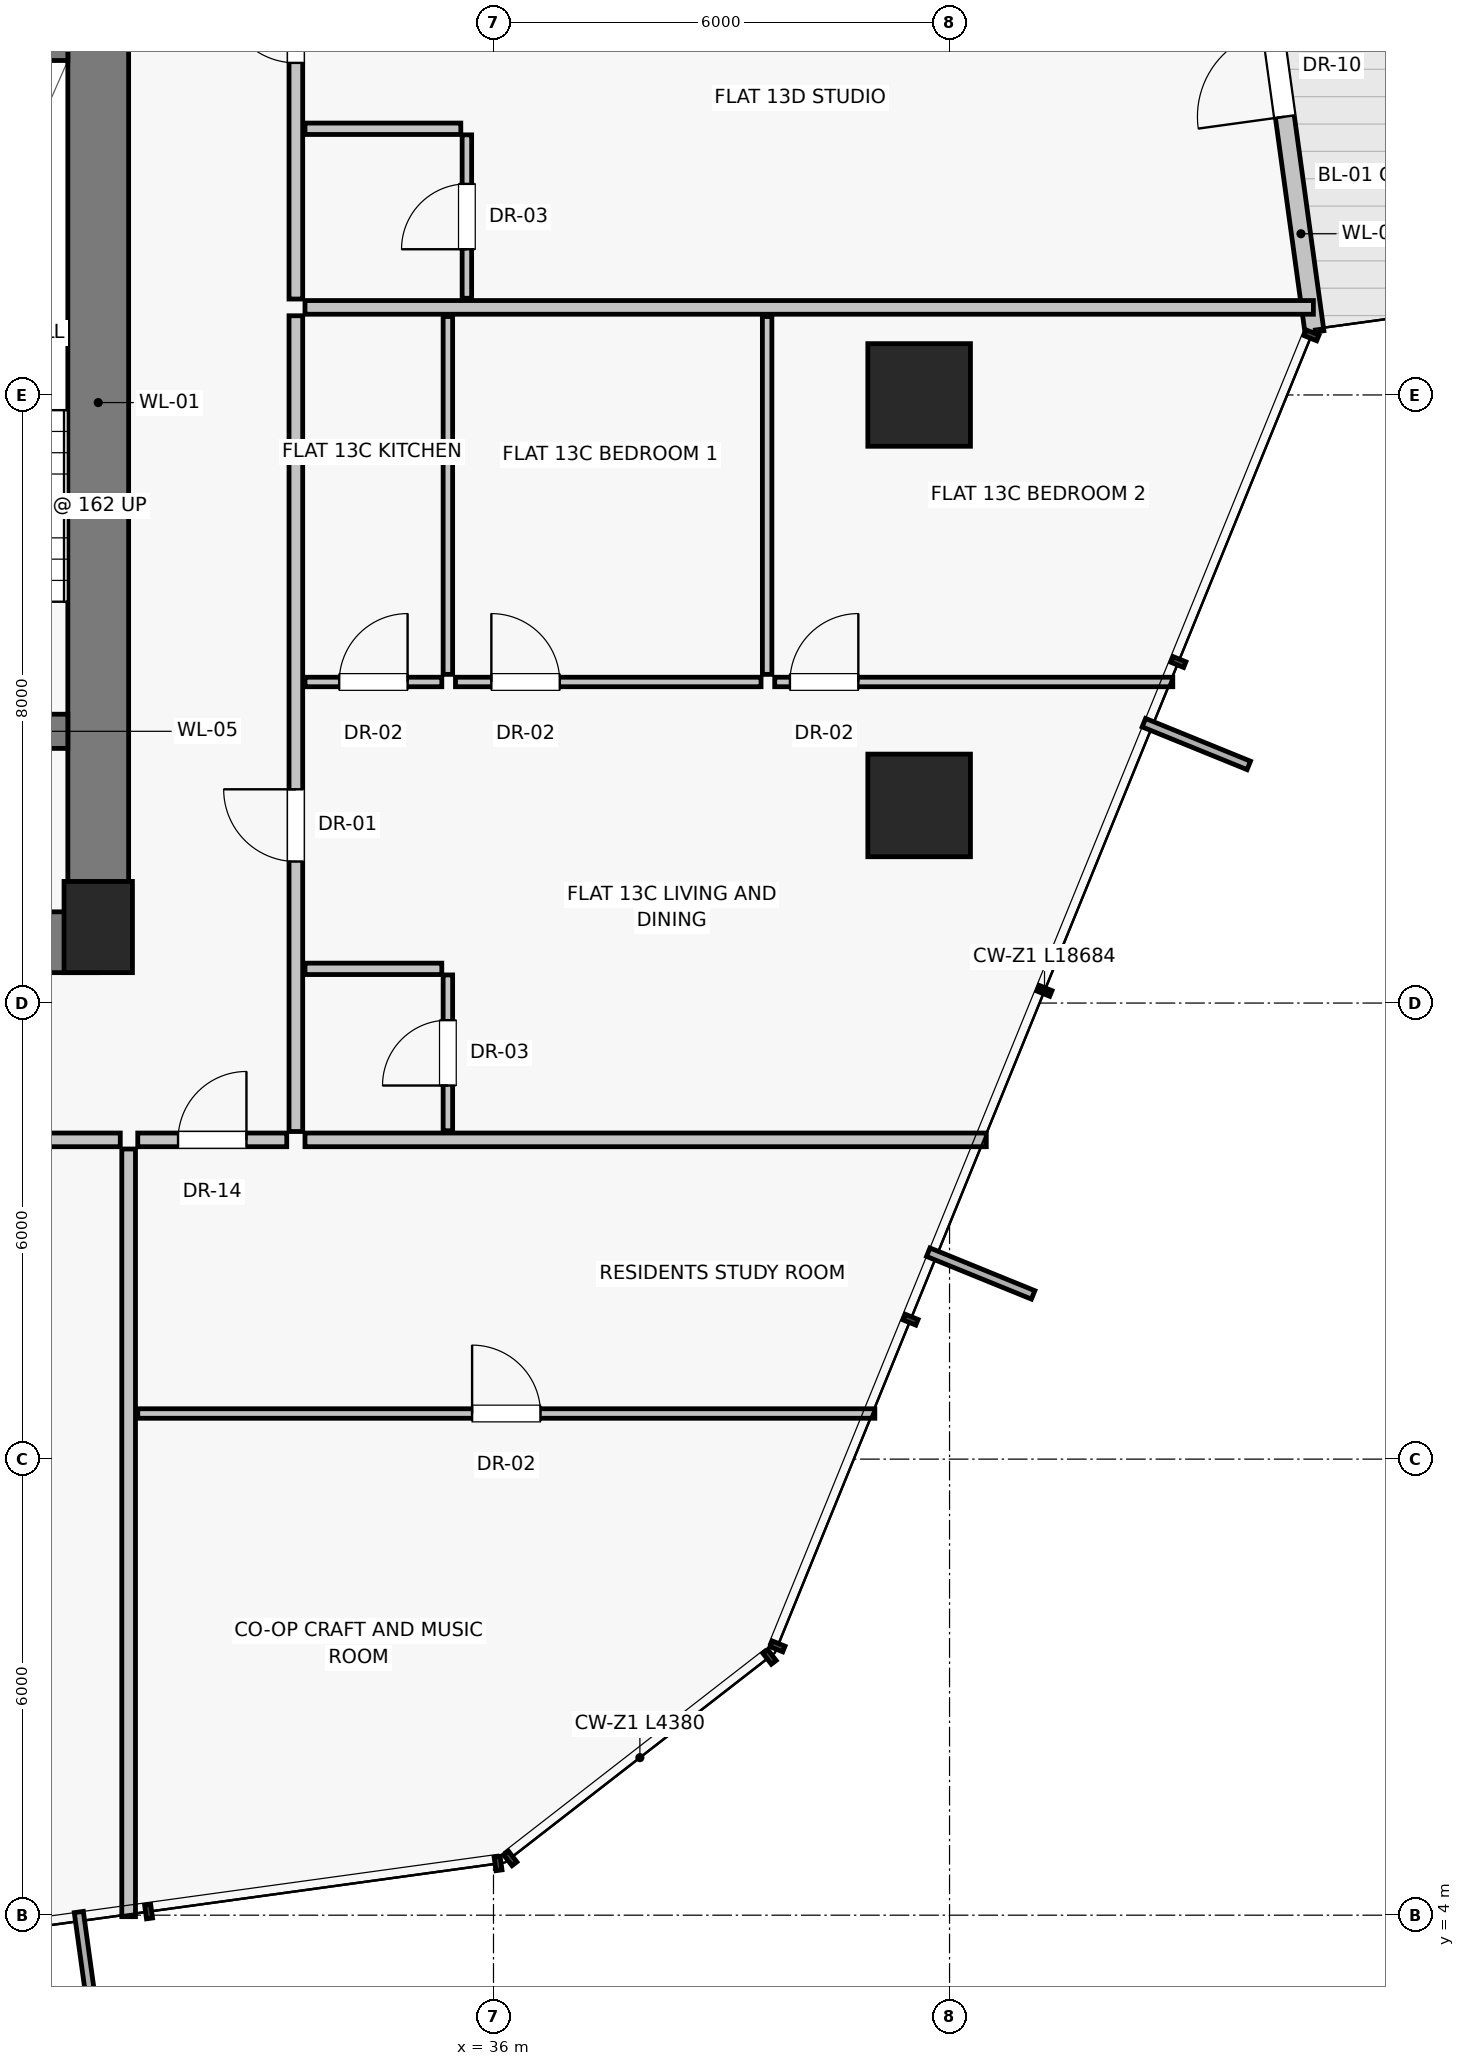
"""IFC4 building model, lengths in metres.
Left out: names, types, materials, properties, quantities, classifications, styles, units other than length and angle.
Written with IfcOpenShell. Run it as: python <this file> out.ifc"""

import sys

from ifc_helpers import new_model, si_unit, direction, frame, frame_2d, origin, origin_2d, place, context, subcontext, project, spatial, rectangle, extrude, source, transform, mapped, element, fill, save


model = new_model("IFC4")
c1 = context("Model", 3, precision=1e-05, world=origin(), true_north=direction((0.0, 1.0)))
c2 = subcontext(c1, "Body", "Model", "MODEL_VIEW")
j1 = project(units=[si_unit("LENGTHUNIT", "METRE"), si_unit("PLANEANGLEUNIT", "RADIAN")], contexts=[c1])
p1 = place(None, origin())
s1 = spatial("IfcSite", under=j1, at=p1, CompositionType="ELEMENT")
p2 = place(p1, origin())
s2 = spatial("IfcBuilding", under=s1, at=p2, CompositionType="ELEMENT")
p3 = place(p2, frame((0.0, 0.0, 50.05)))
s3 = spatial("IfcBuildingStorey", under=s2, at=p3, CompositionType="ELEMENT", Elevation=50.05)
p4 = place(p3, frame((30.8, 17.0, 0.0), z_axis=(0.0, 0.0, 1.0), x_axis=(1.0, 0.0, 0.0)))
e1 = element("IfcColumn", 1, at=p4, inside=s3, PredefinedType="PILASTER", context=c2, shape_type="SweptSolid", body=[
    extrude(rectangle(XDim=0.9, YDim=1.2, at=origin_2d()), origin(), (0.0, 0.0, 1.0), 3.25),
])
for number, where, z_axis, x_axis in (
    (2, (41.6, 18.6, 0.0), (0.0, 0.0, 1.0), (1.0, 0.0, 0.0)),
    (3, (41.6, 24.0, 0.0), (0.0, 0.0, 1.0), (1.0, 0.0, 0.0)),
):
    element("IfcColumn", number, at=place(p3, frame(where, z_axis=z_axis, x_axis=x_axis)), inside=s3, PredefinedType="COLUMN", context=c2, shape_type="SweptSolid", body=[
        extrude(rectangle(XDim=1.35, YDim=1.35, at=origin_2d()), origin(), (0.0, 0.0, 1.0), 3.25),
    ])
p5 = place(p3, frame((46.801, 24.828, 0.0), z_axis=(0.0, 0.0, 1.0), x_axis=(-0.136411912987, 0.990652204356, 0.0)))
e4 = element("IfcWall", 4, at=p5, inside=s3, PredefinedType="SOLIDWALL", context=c2, shape_type="SweptSolid", body=[
    extrude(rectangle(XDim=4.58, YDim=0.25, at=frame_2d((2.29, 0.0))), origin(), (0.0, 0.0, 1.0), 3.0),
])
p6 = place(p5, frame((2.86, 0.0, 0.0)))
e5 = element("IfcOpeningElement", 5, at=p6, cuts=e4, PredefinedType="OPENING", context=c2, shape_type="SweptSolid", body=[
    extrude(rectangle(XDim=1.15, YDim=2.25, at=frame_2d((0.575, 1.125))), frame((0.0, 0.135, 0.0), z_axis=(0.0, -1.0, 0.0), x_axis=(1.0, 0.0, 0.0)), (0.0, 0.0, 1.0), 0.27),
])
p7 = place(p3, frame((30.8, 16.8, 0.0), z_axis=(0.0, 0.0, 1.0), x_axis=(0.0, 1.0, 0.0)))
e6 = element("IfcWall", 6, at=p7, inside=s3, PredefinedType="SHEAR", context=c2, shape_type="SweptSolid", body=[
    extrude(rectangle(XDim=14.2, YDim=0.8, at=frame_2d((7.1, 0.0))), origin(), (0.0, 0.0, 1.0), 3.0),
])
p8 = place(p3, frame((24.95, 16.8, 0.0), z_axis=(0.0, 0.0, 1.0), x_axis=(1.0, 0.0, 0.0)))
e7 = element("IfcWall", 7, at=p8, inside=s3, PredefinedType="SHEAR", context=c2, shape_type="SweptSolid", body=[
    extrude(rectangle(XDim=5.85, YDim=0.8, at=frame_2d((2.925, 0.0))), origin(), (0.0, 0.0, 1.0), 3.0),
])
p9 = place(p8, frame((2.15, 0.0, 0.0)))
e8 = element("IfcOpeningElement", 8, at=p9, cuts=e7, PredefinedType="OPENING", context=c2, shape_type="SweptSolid", body=[
    extrude(rectangle(XDim=1.2, YDim=2.03, at=frame_2d((0.6, 1.015))), frame((0.0, 0.41, 0.0), z_axis=(0.0, -1.0, 0.0), x_axis=(1.0, 0.0, 0.0)), (0.0, 0.0, 1.0), 0.82),
])
p10 = place(p3, frame((26.975, 19.575, 0.0), z_axis=(0.0, 0.0, 1.0), x_axis=(1.0, 0.0, 0.0)))
e9 = element("IfcWall", 9, at=p10, inside=s3, PredefinedType="SHEAR", context=c2, shape_type="SweptSolid", body=[
    extrude(rectangle(XDim=3.425, YDim=0.45, at=frame_2d((1.712, 0.0))), origin(), (0.0, 0.0, 1.0), 3.0),
])
p11 = place(p10, frame((1.05, 0.0, 0.0)))
e10 = element("IfcOpeningElement", 10, at=p11, cuts=e9, PredefinedType="OPENING", context=c2, shape_type="SweptSolid", body=[
    extrude(rectangle(XDim=1.1, YDim=2.03, at=frame_2d((0.55, 1.015))), frame((0.0, 0.235, 0.0), z_axis=(0.0, -1.0, 0.0), x_axis=(1.0, 0.0, 0.0)), (0.0, 0.0, 1.0), 0.47),
])
p12 = place(p3, frame((26.975, 28.625, 0.0), z_axis=(0.0, 0.0, 1.0), x_axis=(1.0, 0.0, 0.0)))
e11 = element("IfcWall", 11, at=p12, inside=s3, PredefinedType="SHEAR", context=c2, shape_type="SweptSolid", body=[
    extrude(rectangle(XDim=3.425, YDim=0.45, at=frame_2d((1.712, 0.0))), origin(), (0.0, 0.0, 1.0), 3.0),
])
p13 = place(p3, frame((31.2, 14.08, 0.0), z_axis=(0.0, 0.0, 1.0), x_axis=(0.0, -1.0, 0.0)))
e12 = element("IfcWall", 12, at=p13, inside=s3, PredefinedType="PARTITIONING", context=c2, shape_type="SweptSolid", body=[
    extrude(rectangle(XDim=10.1, YDim=0.18, at=frame_2d((5.05, 0.0))), origin(), (0.0, 0.0, 1.0), 3.0),
])
p14 = place(p3, frame((24.368, 14.2, 0.0), z_axis=(0.0, 0.0, 1.0), x_axis=(1.0, 0.0, 0.0)))
e13 = element("IfcWall", 13, at=p14, inside=s3, PredefinedType="PARTITIONING", context=c2, shape_type="SweptSolid", body=[
    extrude(rectangle(XDim=6.722, YDim=0.18, at=frame_2d((3.361, 0.0))), origin(), (0.0, 0.0, 1.0), 3.0),
])
p15 = place(p14, frame((2.861, 0.0, 0.0)))
e14 = element("IfcOpeningElement", 14, at=p15, cuts=e13, PredefinedType="OPENING", context=c2, shape_type="SweptSolid", body=[
    extrude(rectangle(XDim=1.0, YDim=2.01, at=frame_2d((0.5, 1.005))), frame((0.0, 0.1, 0.0), z_axis=(0.0, -1.0, 0.0), x_axis=(1.0, 0.0, 0.0)), (0.0, 0.0, 1.0), 0.2),
])
p16 = place(p3, frame((33.52, 14.2, 0.0), z_axis=(0.0, 0.0, 1.0), x_axis=(1.0, 0.0, 0.0)))
e15 = element("IfcWall", 15, at=p16, inside=s3, PredefinedType="PARTITIONING", context=c2, shape_type="SweptSolid", body=[
    extrude(rectangle(XDim=8.963, YDim=0.18, at=frame_2d((4.482, 0.0))), origin(), (0.0, 0.0, 1.0), 3.0),
])
p17 = place(p3, frame((33.4, 14.31, 0.0), z_axis=(0.0, 0.0, 1.0), x_axis=(0.0, 1.0, 0.0)))
e16 = element("IfcWall", 16, at=p17, inside=s3, PredefinedType="PARTITIONING", context=c2, shape_type="SweptSolid", body=[
    extrude(rectangle(XDim=10.732, YDim=0.18, at=frame_2d((5.366, 0.0))), origin(), (0.0, 0.0, 1.0), 3.0),
])
p18 = place(p17, frame((3.552, 0.0, 0.0)))
e17 = element("IfcOpeningElement", 17, at=p18, cuts=e16, PredefinedType="OPENING", context=c2, shape_type="SweptSolid", body=[
    extrude(rectangle(XDim=0.95, YDim=2.02, at=frame_2d((0.475, 1.01))), frame((0.0, 0.1, 0.0), z_axis=(0.0, -1.0, 0.0), x_axis=(1.0, 0.0, 0.0)), (0.0, 0.0, 1.0), 0.2),
])
p19 = place(p3, frame((33.52, 16.45, 0.0), z_axis=(0.0, 0.0, 1.0), x_axis=(1.0, 0.0, 0.0)))
e18 = element("IfcWall", 18, at=p19, inside=s3, PredefinedType="PARTITIONING", context=c2, shape_type="SweptSolid", body=[
    extrude(rectangle(XDim=1.8, YDim=0.15, at=frame_2d((0.9, 0.0))), origin(), (0.0, 0.0, 1.0), 3.0),
])
p20 = place(p3, frame((35.4, 14.32, 0.0), z_axis=(0.0, 0.0, 1.0), x_axis=(0.0, 1.0, 0.0)))
e19 = element("IfcWall", 19, at=p20, inside=s3, PredefinedType="PARTITIONING", context=c2, shape_type="SweptSolid", body=[
    extrude(rectangle(XDim=2.05, YDim=0.125, at=frame_2d((1.025, 0.0))), origin(), (0.0, 0.0, 1.0), 3.0),
])
p21 = place(p20, frame((0.595, 0.0, 0.0)))
e20 = element("IfcOpeningElement", 20, at=p21, cuts=e19, PredefinedType="OPENING", context=c2, shape_type="SweptSolid", body=[
    extrude(rectangle(XDim=0.86, YDim=2.01, at=frame_2d((0.43, 1.005))), frame((0.0, 0.073, 0.0), z_axis=(0.0, -1.0, 0.0), x_axis=(1.0, 0.0, 0.0)), (0.0, 0.0, 1.0), 0.145),
])
p22 = place(p3, frame((33.52, 20.224, 0.0), z_axis=(0.0, 0.0, 1.0), x_axis=(1.0, 0.0, 0.0)))
e21 = element("IfcWall", 21, at=p22, inside=s3, PredefinedType="PARTITIONING", context=c2, shape_type="SweptSolid", body=[
    extrude(rectangle(XDim=1.8, YDim=0.125, at=frame_2d((0.9, 0.0))), origin(), (0.0, 0.0, 1.0), 3.0),
])
p23 = place(p22, frame((0.45, 0.0, 0.0)))
e22 = element("IfcOpeningElement", 22, at=p23, cuts=e21, PredefinedType="OPENING", context=c2, shape_type="SweptSolid", body=[
    extrude(rectangle(XDim=0.9, YDim=2.01, at=frame_2d((0.45, 1.005))), frame((0.0, 0.073, 0.0), z_axis=(0.0, -1.0, 0.0), x_axis=(1.0, 0.0, 0.0)), (0.0, 0.0, 1.0), 0.145),
])
for number, where, z_axis, x_axis in (
    (23, (35.4, 20.324, 0.0), (0.0, 0.0, 1.0), (0.0, 1.0, 0.0)),
    (24, (39.6, 20.324, 0.0), (0.0, 0.0, 1.0), (0.0, 1.0, 0.0)),
):
    element("IfcWall", number, at=place(p3, frame(where, z_axis=z_axis, x_axis=x_axis)), inside=s3, PredefinedType="PARTITIONING", context=c2, shape_type="SweptSolid", body=[
        extrude(rectangle(XDim=4.708, YDim=0.125, at=frame_2d((2.354, 0.0))), origin(), (0.0, 0.0, 1.0), 3.0),
    ])
p24 = place(p3, frame((35.5, 20.224, 0.0), z_axis=(0.0, 0.0, 1.0), x_axis=(1.0, 0.0, 0.0)))
e25 = element("IfcWall", 25, at=p24, inside=s3, PredefinedType="PARTITIONING", context=c2, shape_type="SweptSolid", body=[
    extrude(rectangle(XDim=4.02, YDim=0.125, at=frame_2d((2.01, 0.0))), origin(), (0.0, 0.0, 1.0), 3.0),
])
p25 = place(p24, frame((0.472, 0.0, 0.0)))
e26 = element("IfcOpeningElement", 26, at=p25, cuts=e25, PredefinedType="OPENING", context=c2, shape_type="SweptSolid", body=[
    extrude(rectangle(XDim=0.9, YDim=2.01, at=frame_2d((0.45, 1.005))), frame((0.0, 0.073, 0.0), z_axis=(0.0, -1.0, 0.0), x_axis=(1.0, 0.0, 0.0)), (0.0, 0.0, 1.0), 0.145),
])
p26 = place(p3, frame((39.7, 20.224, 0.0), z_axis=(0.0, 0.0, 1.0), x_axis=(1.0, 0.0, 0.0)))
e27 = element("IfcWall", 27, at=p26, inside=s3, PredefinedType="PARTITIONING", context=c2, shape_type="SweptSolid", body=[
    extrude(rectangle(XDim=5.237, YDim=0.125, at=frame_2d((2.619, 0.0))), origin(), (0.0, 0.0, 1.0), 3.0),
])
p27 = place(p26, frame((0.2, 0.0, 0.0)))
e28 = element("IfcOpeningElement", 28, at=p27, cuts=e27, PredefinedType="OPENING", context=c2, shape_type="SweptSolid", body=[
    extrude(rectangle(XDim=0.9, YDim=2.01, at=frame_2d((0.45, 1.005))), frame((0.0, 0.073, 0.0), z_axis=(0.0, -1.0, 0.0), x_axis=(1.0, 0.0, 0.0)), (0.0, 0.0, 1.0), 0.145),
])
p28 = place(p3, frame((33.52, 25.152, 0.0), z_axis=(0.0, 0.0, 1.0), x_axis=(1.0, 0.0, 0.0)))
e29 = element("IfcWall", 29, at=p28, inside=s3, PredefinedType="PARTITIONING", context=c2, shape_type="SweptSolid", body=[
    extrude(rectangle(XDim=13.267, YDim=0.18, at=frame_2d((6.633, 0.0))), origin(), (0.0, 0.0, 1.0), 3.0),
])
p29 = place(p3, frame((33.4, 25.262, 0.0), z_axis=(0.0, 0.0, 1.0), x_axis=(0.0, 1.0, 0.0)))
e30 = element("IfcWall", 30, at=p29, inside=s3, PredefinedType="PARTITIONING", context=c2, shape_type="SweptSolid", body=[
    extrude(rectangle(XDim=5.278, YDim=0.18, at=frame_2d((2.639, 0.0))), origin(), (0.0, 0.0, 1.0), 3.0),
])
p30 = place(p29, frame((3.107, 0.0, 0.0)))
e31 = element("IfcOpeningElement", 31, at=p30, cuts=e30, PredefinedType="OPENING", context=c2, shape_type="SweptSolid", body=[
    extrude(rectangle(XDim=0.95, YDim=2.02, at=frame_2d((0.475, 1.01))), frame((0.0, 0.1, 0.0), z_axis=(0.0, -1.0, 0.0), x_axis=(1.0, 0.0, 0.0)), (0.0, 0.0, 1.0), 0.2),
])
p31 = place(p3, frame((33.52, 27.502, 0.0), z_axis=(0.0, 0.0, 1.0), x_axis=(1.0, 0.0, 0.0)))
e32 = element("IfcWall", 32, at=p31, inside=s3, PredefinedType="PARTITIONING", context=c2, shape_type="SweptSolid", body=[
    extrude(rectangle(XDim=2.05, YDim=0.15, at=frame_2d((1.025, 0.0))), origin(), (0.0, 0.0, 1.0), 3.0),
])
p32 = place(p3, frame((35.65, 25.272, 0.0), z_axis=(0.0, 0.0, 1.0), x_axis=(0.0, 1.0, 0.0)))
e33 = element("IfcWall", 33, at=p32, inside=s3, PredefinedType="PARTITIONING", context=c2, shape_type="SweptSolid", body=[
    extrude(rectangle(XDim=2.15, YDim=0.125, at=frame_2d((1.075, 0.0))), origin(), (0.0, 0.0, 1.0), 3.0),
])
p33 = place(p32, frame((0.645, 0.0, 0.0)))
e34 = element("IfcOpeningElement", 34, at=p33, cuts=e33, PredefinedType="OPENING", context=c2, shape_type="SweptSolid", body=[
    extrude(rectangle(XDim=0.86, YDim=2.01, at=frame_2d((0.43, 1.005))), frame((0.0, 0.073, 0.0), z_axis=(0.0, -1.0, 0.0), x_axis=(1.0, 0.0, 0.0)), (0.0, 0.0, 1.0), 0.145),
])
p34 = place(p3, frame((31.32, 14.2, 0.0), z_axis=(0.0, 0.0, 1.0), x_axis=(1.0, 0.0, 0.0)))
e35 = element("IfcWall", 35, at=p34, inside=s3, PredefinedType="PARTITIONING", context=c2, shape_type="SweptSolid", body=[
    extrude(rectangle(XDim=1.96, YDim=0.18, at=frame_2d((0.98, 0.0))), origin(), (0.0, 0.0, 1.0), 3.0),
])
p35 = place(p34, frame((0.53, 0.0, 0.0)))
e36 = element("IfcOpeningElement", 36, at=p35, cuts=e35, PredefinedType="OPENING", context=c2, shape_type="SweptSolid", body=[
    extrude(rectangle(XDim=0.9, YDim=2.01, at=frame_2d((0.45, 1.005))), frame((0.0, 0.1, 0.0), z_axis=(0.0, -1.0, 0.0), x_axis=(1.0, 0.0, 0.0)), (0.0, 0.0, 1.0), 0.2),
])
p36 = place(p3, frame((31.32, 10.6, 0.0), z_axis=(0.0, 0.0, 1.0), x_axis=(1.0, 0.0, 0.0)))
e37 = element("IfcWall", 37, at=p36, inside=s3, PredefinedType="PARTITIONING", context=c2, shape_type="SweptSolid", body=[
    extrude(rectangle(XDim=9.697, YDim=0.125, at=frame_2d((4.849, 0.0))), origin(), (0.0, 0.0, 1.0), 3.0),
])
p37 = place(p36, frame((4.399, 0.0, 0.0)))
e38 = element("IfcOpeningElement", 38, at=p37, cuts=e37, PredefinedType="OPENING", context=c2, shape_type="SweptSolid", body=[
    extrude(rectangle(XDim=0.9, YDim=2.01, at=frame_2d((0.45, 1.005))), frame((0.0, 0.073, 0.0), z_axis=(0.0, -1.0, 0.0), x_axis=(1.0, 0.0, 0.0)), (0.0, 0.0, 1.0), 0.145),
])
m1 = source(origin(), c2, "Body", "SweptSolid", [
    extrude(rectangle(XDim=1.15, YDim=2.25, at=frame_2d((0.575, 1.125))), frame((0.0, 0.025, 0.0), z_axis=(0.0, -1.0, 0.0), x_axis=(1.0, 0.0, 0.0)), (0.0, 0.0, 1.0), 0.05),
])
p38 = place(p6, frame((1.15, 0.0, 0.0), z_axis=(0.0, 0.0, 1.0), x_axis=(-1.0, 0.0, 0.0)))
e39 = element("IfcDoor", 39, at=p38, inside=s3, OperationType="SINGLE_SWING_LEFT", PredefinedType="DOOR", context=c2, shape_type="MappedRepresentation", body=[
    mapped(m1, transform((0.0, 0.0, 0.0), scale=1.0)),
])
fill(e5, e39)
m2 = source(origin(), c2, "Body", "SweptSolid", [
    extrude(rectangle(XDim=0.95, YDim=2.02, at=frame_2d((0.475, 1.01))), frame((0.0, 0.025, 0.0), z_axis=(0.0, -1.0, 0.0), x_axis=(1.0, 0.0, 0.0)), (0.0, 0.0, 1.0), 0.05),
])
p39 = place(p18, origin())
e40 = element("IfcDoor", 40, at=p39, inside=s3, OperationType="SINGLE_SWING_RIGHT", PredefinedType="DOOR", context=c2, shape_type="MappedRepresentation", body=[
    mapped(m2, transform((0.0, 0.0, 0.0), scale=1.0)),
])
fill(e17, e40)
m3 = source(origin(), c2, "Body", "SweptSolid", [
    extrude(rectangle(XDim=0.86, YDim=2.01, at=frame_2d((0.43, 1.005))), frame((0.0, 0.025, 0.0), z_axis=(0.0, -1.0, 0.0), x_axis=(1.0, 0.0, 0.0)), (0.0, 0.0, 1.0), 0.05),
])
p40 = place(p21, origin())
e41 = element("IfcDoor", 41, at=p40, inside=s3, OperationType="SINGLE_SWING_LEFT", PredefinedType="DOOR", context=c2, shape_type="MappedRepresentation", body=[
    mapped(m3, transform((0.0, 0.0, 0.0), scale=1.0)),
])
fill(e20, e41)
m4 = source(origin(), c2, "Body", "SweptSolid", [
    extrude(rectangle(XDim=0.9, YDim=2.01, at=frame_2d((0.45, 1.005))), frame((0.0, 0.025, 0.0), z_axis=(0.0, -1.0, 0.0), x_axis=(1.0, 0.0, 0.0)), (0.0, 0.0, 1.0), 0.05),
])
p41 = place(p23, origin())
e42 = element("IfcDoor", 42, at=p41, inside=s3, OperationType="SINGLE_SWING_RIGHT", PredefinedType="DOOR", context=c2, shape_type="MappedRepresentation", body=[
    mapped(m4, transform((0.0, 0.0, 0.0), scale=1.0)),
])
fill(e22, e42)
p42 = place(p25, origin())
e43 = element("IfcDoor", 43, at=p42, inside=s3, OperationType="SINGLE_SWING_LEFT", PredefinedType="DOOR", context=c2, shape_type="MappedRepresentation", body=[
    mapped(m4, transform((0.0, 0.0, 0.0), scale=1.0)),
])
fill(e26, e43)
p43 = place(p27, origin())
e44 = element("IfcDoor", 44, at=p43, inside=s3, OperationType="SINGLE_SWING_RIGHT", PredefinedType="DOOR", context=c2, shape_type="MappedRepresentation", body=[
    mapped(m4, transform((0.0, 0.0, 0.0), scale=1.0)),
])
fill(e28, e44)
p44 = place(p30, origin())
e45 = element("IfcDoor", 45, at=p44, inside=s3, OperationType="SINGLE_SWING_RIGHT", PredefinedType="DOOR", context=c2, shape_type="MappedRepresentation", body=[
    mapped(m2, transform((0.0, 0.0, 0.0), scale=1.0)),
])
fill(e31, e45)
p45 = place(p33, origin())
e46 = element("IfcDoor", 46, at=p45, inside=s3, OperationType="SINGLE_SWING_LEFT", PredefinedType="DOOR", context=c2, shape_type="MappedRepresentation", body=[
    mapped(m3, transform((0.0, 0.0, 0.0), scale=1.0)),
])
fill(e34, e46)
p46 = place(p35, origin())
e47 = element("IfcDoor", 47, at=p46, inside=s3, OperationType="SINGLE_SWING_RIGHT", PredefinedType="DOOR", context=c2, shape_type="MappedRepresentation", body=[
    mapped(m4, transform((0.0, 0.0, 0.0), scale=1.0)),
])
fill(e36, e47)
p47 = place(p37, origin())
e48 = element("IfcDoor", 48, at=p47, inside=s3, OperationType="SINGLE_SWING_LEFT", PredefinedType="DOOR", context=c2, shape_type="MappedRepresentation", body=[
    mapped(m4, transform((0.0, 0.0, 0.0), scale=1.0)),
])
fill(e38, e48)
save(model, sys.argv[1])
